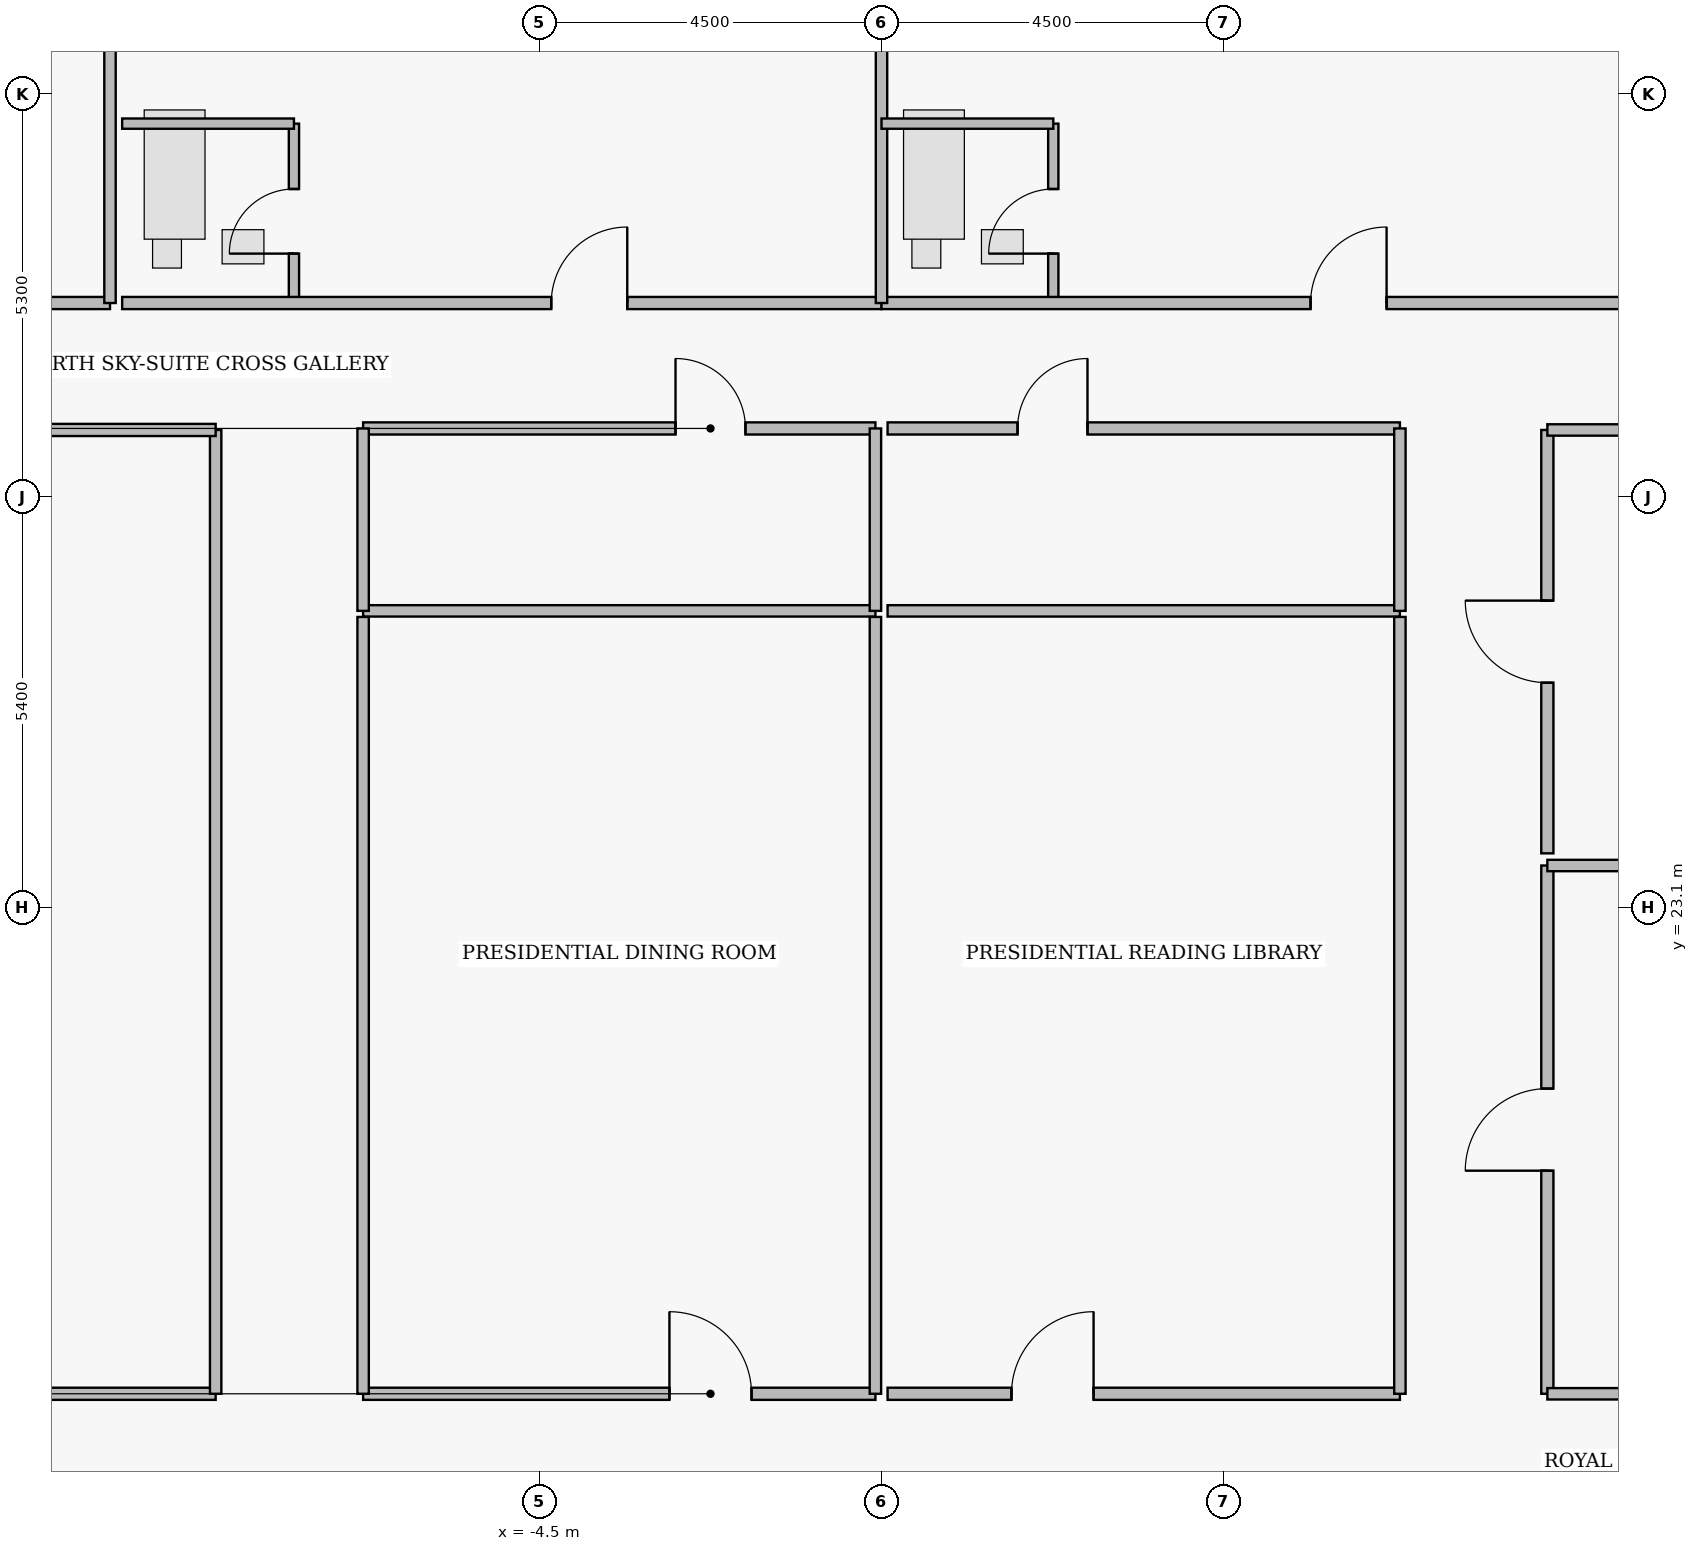
"""IFC4 building model, lengths in metres.
Left out: names, types, materials, properties, quantities, classifications, styles, units other than length and angle.
Written with IfcOpenShell. Run it as: python <this file> out.ifc"""

import sys

from ifc_helpers import new_model, si_unit, direction, frame, frame_2d, origin, place, context, subcontext, project, spatial, rectangle, extrude, element, fill, save


model = new_model("IFC4")
c1 = context("Model", 3, precision=1e-05, world=origin(), true_north=direction((0.0, 1.0)))
c2 = subcontext(c1, "Body", "Model", "MODEL_VIEW")
j1 = project(units=[si_unit("LENGTHUNIT", "METRE"), si_unit("PLANEANGLEUNIT", "RADIAN")], contexts=[c1])
p1 = place(None, origin())
s1 = spatial("IfcSite", under=j1, at=p1, CompositionType="ELEMENT")
p2 = place(p1, origin())
s2 = spatial("IfcBuilding", under=s1, at=p2, CompositionType="ELEMENT")
p3 = place(p2, frame((0.0, 0.0, 250.75)))
s3 = spatial("IfcBuildingStorey", under=s2, at=p3, CompositionType="ELEMENT", Elevation=250.75)
p4 = place(p3, frame((-20.14, 31.05, 0.0), z_axis=(0.0, 0.0, 1.0), x_axis=(1.0, 0.0, 0.0)))
e1 = element("IfcWall", 1, at=p4, inside=s3, PredefinedType="PARTITIONING", context=c2, shape_type="SweptSolid", body=[
    extrude(rectangle(XDim=9.99, YDim=0.16, at=frame_2d((4.995, 0.0))), origin(), (0.0, 0.0, 1.0), 3.48),
])
p5 = place(p4, frame((5.645, 0.0, 0.0)))
e2 = element("IfcOpeningElement", 2, at=p5, cuts=e1, PredefinedType="OPENING", context=c2, shape_type="SweptSolid", body=[
    extrude(rectangle(XDim=1.0, YDim=2.15, at=frame_2d((0.5, 1.075))), frame((0.0, 0.09, 0.0), z_axis=(0.0, -1.0, 0.0), x_axis=(1.0, 0.0, 0.0)), (0.0, 0.0, 1.0), 0.18),
])
p6 = place(p3, frame((-7.73, 31.05, 0.0), z_axis=(0.0, 0.0, 1.0), x_axis=(0.0, 1.0, 0.0)))
e3 = element("IfcWall", 3, at=p6, inside=s3, PredefinedType="PLUMBINGWALL", context=c2, shape_type="SweptSolid", body=[
    extrude(rectangle(XDim=2.36, YDim=0.135, at=frame_2d((1.18, 0.0))), origin(), (0.0, 0.0, 1.0), 3.48),
])
p7 = place(p6, frame((0.65, 0.0, 0.0)))
e4 = element("IfcOpeningElement", 4, at=p7, cuts=e3, PredefinedType="OPENING", context=c2, shape_type="SweptSolid", body=[
    extrude(rectangle(XDim=0.85, YDim=2.1, at=frame_2d((0.425, 1.05))), frame((0.0, 0.077, 0.0), z_axis=(0.0, -1.0, 0.0), x_axis=(1.0, 0.0, 0.0)), (0.0, 0.0, 1.0), 0.155),
])
p8 = place(p3, frame((-9.99, 31.05, 0.0), z_axis=(0.0, 0.0, 1.0), x_axis=(1.0, 0.0, 0.0)))
e5 = element("IfcWall", 5, at=p8, inside=s3, PredefinedType="PARTITIONING", context=c2, shape_type="SweptSolid", body=[
    extrude(rectangle(XDim=9.99, YDim=0.16, at=frame_2d((4.995, 0.0))), origin(), (0.0, 0.0, 1.0), 3.48),
])
p9 = place(p8, frame((5.645, 0.0, 0.0)))
e6 = element("IfcOpeningElement", 6, at=p9, cuts=e5, PredefinedType="OPENING", context=c2, shape_type="SweptSolid", body=[
    extrude(rectangle(XDim=1.0, YDim=2.15, at=frame_2d((0.5, 1.075))), frame((0.0, 0.09, 0.0), z_axis=(0.0, -1.0, 0.0), x_axis=(1.0, 0.0, 0.0)), (0.0, 0.0, 1.0), 0.18),
])
p10 = place(p3, frame((2.26, 31.05, 0.0), z_axis=(0.0, 0.0, 1.0), x_axis=(0.0, 1.0, 0.0)))
e7 = element("IfcWall", 7, at=p10, inside=s3, PredefinedType="PLUMBINGWALL", context=c2, shape_type="SweptSolid", body=[
    extrude(rectangle(XDim=2.36, YDim=0.135, at=frame_2d((1.18, 0.0))), origin(), (0.0, 0.0, 1.0), 3.48),
])
p11 = place(p10, frame((0.65, 0.0, 0.0)))
e8 = element("IfcOpeningElement", 8, at=p11, cuts=e7, PredefinedType="OPENING", context=c2, shape_type="SweptSolid", body=[
    extrude(rectangle(XDim=0.85, YDim=2.1, at=frame_2d((0.425, 1.05))), frame((0.0, 0.077, 0.0), z_axis=(0.0, -1.0, 0.0), x_axis=(1.0, 0.0, 0.0)), (0.0, 0.0, 1.0), 0.155),
])
p12 = place(p3, frame((0.0, 31.05, 0.0), z_axis=(0.0, 0.0, 1.0), x_axis=(1.0, 0.0, 0.0)))
e9 = element("IfcWall", 9, at=p12, inside=s3, PredefinedType="PARTITIONING", context=c2, shape_type="SweptSolid", body=[
    extrude(rectangle(XDim=9.99, YDim=0.16, at=frame_2d((4.995, 0.0))), origin(), (0.0, 0.0, 1.0), 3.48),
])
p13 = place(p12, frame((5.645, 0.0, 0.0)))
e10 = element("IfcOpeningElement", 10, at=p13, cuts=e9, PredefinedType="OPENING", context=c2, shape_type="SweptSolid", body=[
    extrude(rectangle(XDim=1.0, YDim=2.15, at=frame_2d((0.5, 1.075))), frame((0.0, 0.09, 0.0), z_axis=(0.0, -1.0, 0.0), x_axis=(1.0, 0.0, 0.0)), (0.0, 0.0, 1.0), 0.18),
])
p14 = place(p3, frame((-6.82, 29.4, 0.0), z_axis=(0.0, 0.0, 1.0), x_axis=(1.0, 0.0, 0.0)))
e11 = element("IfcWall", 11, at=p14, inside=s3, PredefinedType="PARTITIONING", context=c2, shape_type="SweptSolid", body=[
    extrude(rectangle(XDim=6.74, YDim=0.16, at=frame_2d((3.37, 0.0))), origin(), (0.0, 0.0, 1.0), 3.48),
])
p15 = place(p14, frame((4.11, 0.0, 0.0)))
e12 = element("IfcOpeningElement", 12, at=p15, cuts=e11, PredefinedType="OPENING", context=c2, shape_type="SweptSolid", body=[
    extrude(rectangle(XDim=0.92, YDim=2.12, at=frame_2d((0.46, 1.06))), frame((0.0, 0.09, 0.0), z_axis=(0.0, -1.0, 0.0), x_axis=(1.0, 0.0, 0.0)), (0.0, 0.0, 1.0), 0.18),
])
p16 = place(p3, frame((0.08, 29.4, 0.0), z_axis=(0.0, 0.0, 1.0), x_axis=(1.0, 0.0, 0.0)))
e13 = element("IfcWall", 13, at=p16, inside=s3, PredefinedType="PARTITIONING", context=c2, shape_type="SweptSolid", body=[
    extrude(rectangle(XDim=6.74, YDim=0.16, at=frame_2d((3.37, 0.0))), origin(), (0.0, 0.0, 1.0), 3.48),
])
p17 = place(p16, frame((1.71, 0.0, 0.0)))
e14 = element("IfcOpeningElement", 14, at=p17, cuts=e13, PredefinedType="OPENING", context=c2, shape_type="SweptSolid", body=[
    extrude(rectangle(XDim=0.92, YDim=2.12, at=frame_2d((0.46, 1.06))), frame((0.0, 0.09, 0.0), z_axis=(0.0, -1.0, 0.0), x_axis=(1.0, 0.0, 0.0)), (0.0, 0.0, 1.0), 0.18),
])
p18 = place(p3, frame((-6.82, 16.7, 0.0), z_axis=(0.0, 0.0, 1.0), x_axis=(1.0, 0.0, 0.0)))
e15 = element("IfcWall", 15, at=p18, inside=s3, PredefinedType="PARTITIONING", context=c2, shape_type="SweptSolid", body=[
    extrude(rectangle(XDim=6.74, YDim=0.16, at=frame_2d((3.37, 0.0))), origin(), (0.0, 0.0, 1.0), 3.076),
])
p19 = place(p18, frame((4.03, 0.0, 0.0)))
e16 = element("IfcOpeningElement", 16, at=p19, cuts=e15, PredefinedType="OPENING", context=c2, shape_type="SweptSolid", body=[
    extrude(rectangle(XDim=1.08, YDim=2.18, at=frame_2d((0.54, 1.09))), frame((0.0, 0.09, 0.0), z_axis=(0.0, -1.0, 0.0), x_axis=(1.0, 0.0, 0.0)), (0.0, 0.0, 1.0), 0.18),
])
p20 = place(p3, frame((0.08, 16.7, 0.0), z_axis=(0.0, 0.0, 1.0), x_axis=(1.0, 0.0, 0.0)))
e17 = element("IfcWall", 17, at=p20, inside=s3, PredefinedType="PARTITIONING", context=c2, shape_type="SweptSolid", body=[
    extrude(rectangle(XDim=6.74, YDim=0.16, at=frame_2d((3.37, 0.0))), origin(), (0.0, 0.0, 1.0), 3.076),
])
p21 = place(p20, frame((1.63, 0.0, 0.0)))
e18 = element("IfcOpeningElement", 18, at=p21, cuts=e17, PredefinedType="OPENING", context=c2, shape_type="SweptSolid", body=[
    extrude(rectangle(XDim=1.08, YDim=2.18, at=frame_2d((0.54, 1.09))), frame((0.0, 0.09, 0.0), z_axis=(0.0, -1.0, 0.0), x_axis=(1.0, 0.0, 0.0)), (0.0, 0.0, 1.0), 0.18),
])
p22 = place(p3, frame((-22.64, 16.7, 0.0), z_axis=(0.0, 0.0, 1.0), x_axis=(1.0, 0.0, 0.0)))
e19 = element("IfcWall", 19, at=p22, inside=s3, PredefinedType="PARTITIONING", context=c2, shape_type="SweptSolid", body=[
    extrude(rectangle(XDim=13.88, YDim=0.16, at=frame_2d((6.94, 0.0))), origin(), (0.0, 0.0, 1.0), 3.076),
])
p23 = place(p22, frame((7.59, 0.0, 0.0)))
e20 = element("IfcOpeningElement", 20, at=p23, cuts=e19, PredefinedType="OPENING", context=c2, shape_type="SweptSolid", body=[
    extrude(rectangle(XDim=1.0, YDim=2.15, at=frame_2d((0.5, 1.075))), frame((0.0, 0.09, 0.0), z_axis=(0.0, -1.0, 0.0), x_axis=(1.0, 0.0, 0.0)), (0.0, 0.0, 1.0), 0.18),
])
p24 = place(p3, frame((8.76, 16.7, 0.0), z_axis=(0.0, 0.0, 1.0), x_axis=(0.0, 1.0, 0.0)))
e21 = element("IfcWall", 21, at=p24, inside=s3, PredefinedType="PARTITIONING", context=c2, shape_type="SweptSolid", body=[
    extrude(rectangle(XDim=6.95, YDim=0.16, at=frame_2d((3.475, 0.0))), origin(), (0.0, 0.0, 1.0), 3.48),
])
p25 = place(p24, frame((2.935, 0.0, 0.0)))
e22 = element("IfcOpeningElement", 22, at=p25, cuts=e21, PredefinedType="OPENING", context=c2, shape_type="SweptSolid", body=[
    extrude(rectangle(XDim=1.08, YDim=2.18, at=frame_2d((0.54, 1.09))), frame((0.0, 0.09, 0.0), z_axis=(0.0, -1.0, 0.0), x_axis=(1.0, 0.0, 0.0)), (0.0, 0.0, 1.0), 0.18),
])
p26 = place(p3, frame((8.76, 23.81, 0.0), z_axis=(0.0, 0.0, 1.0), x_axis=(0.0, 1.0, 0.0)))
e23 = element("IfcWall", 23, at=p26, inside=s3, PredefinedType="PARTITIONING", context=c2, shape_type="SweptSolid", body=[
    extrude(rectangle(XDim=5.57, YDim=0.16, at=frame_2d((2.785, 0.0))), origin(), (0.0, 0.0, 1.0), 3.48),
])
p27 = place(p26, frame((2.245, 0.0, 0.0)))
e24 = element("IfcOpeningElement", 24, at=p27, cuts=e23, PredefinedType="OPENING", context=c2, shape_type="SweptSolid", body=[
    extrude(rectangle(XDim=1.08, YDim=2.18, at=frame_2d((0.54, 1.09))), frame((0.0, 0.09, 0.0), z_axis=(0.0, -1.0, 0.0), x_axis=(1.0, 0.0, 0.0)), (0.0, 0.0, 1.0), 0.18),
])
p28 = place(p3, frame((-10.15, 31.05, 0.0), z_axis=(0.0, 0.0, 1.0), x_axis=(0.0, 1.0, 0.0)))
e25 = element("IfcWall", 25, at=p28, inside=s3, PredefinedType="PARTITIONING", context=c2, shape_type="SweptSolid", body=[
    extrude(rectangle(XDim=7.87, YDim=0.15, at=frame_2d((3.935, 0.0))), origin(), (0.0, 0.0, 1.0), 3.48),
])
p29 = place(p3, frame((-9.99, 33.41, 0.0), z_axis=(0.0, 0.0, 1.0), x_axis=(1.0, 0.0, 0.0)))
e26 = element("IfcWall", 26, at=p29, inside=s3, PredefinedType="PLUMBINGWALL", context=c2, shape_type="SweptSolid", body=[
    extrude(rectangle(XDim=2.26, YDim=0.135, at=frame_2d((1.13, 0.0))), origin(), (0.0, 0.0, 1.0), 3.076),
])
p30 = place(p3, frame((0.0, 31.05, 0.0), z_axis=(0.0, 0.0, 1.0), x_axis=(0.0, 1.0, 0.0)))
e27 = element("IfcWall", 27, at=p30, inside=s3, PredefinedType="PARTITIONING", context=c2, shape_type="SweptSolid", body=[
    extrude(rectangle(XDim=7.87, YDim=0.15, at=frame_2d((3.935, 0.0))), origin(), (0.0, 0.0, 1.0), 3.48),
])
p31 = place(p3, frame((0.0, 33.41, 0.0), z_axis=(0.0, 0.0, 1.0), x_axis=(1.0, 0.0, 0.0)))
e28 = element("IfcWall", 28, at=p31, inside=s3, PredefinedType="PLUMBINGWALL", context=c2, shape_type="SweptSolid", body=[
    extrude(rectangle(XDim=2.26, YDim=0.135, at=frame_2d((1.13, 0.0))), origin(), (0.0, 0.0, 1.0), 3.076),
])
p32 = place(p3, frame((-6.82, 27.0, 0.0), z_axis=(0.0, 0.0, 1.0), x_axis=(1.0, 0.0, 0.0)))
e29 = element("IfcWall", 29, at=p32, inside=s3, PredefinedType="PARTITIONING", context=c2, shape_type="SweptSolid", body=[
    extrude(rectangle(XDim=6.74, YDim=0.15, at=frame_2d((3.37, 0.0))), origin(), (0.0, 0.0, 1.0), 3.48),
])
for number, where, z_axis, x_axis in (
    (30, (-6.82, 27.0, 0.0), (0.0, 0.0, 1.0), (0.0, 1.0, 0.0)),
    (31, (-0.08, 27.0, 0.0), (0.0, 0.0, 1.0), (0.0, 1.0, 0.0)),
):
    element("IfcWall", number, at=place(p3, frame(where, z_axis=z_axis, x_axis=x_axis)), inside=s3, PredefinedType="PARTITIONING", context=c2, shape_type="SweptSolid", body=[
        extrude(rectangle(XDim=2.4, YDim=0.15, at=frame_2d((1.2, 0.0))), origin(), (0.0, 0.0, 1.0), 3.48),
    ])
p33 = place(p3, frame((0.08, 27.0, 0.0), z_axis=(0.0, 0.0, 1.0), x_axis=(1.0, 0.0, 0.0)))
e32 = element("IfcWall", 32, at=p33, inside=s3, PredefinedType="PARTITIONING", context=c2, shape_type="SweptSolid", body=[
    extrude(rectangle(XDim=6.74, YDim=0.15, at=frame_2d((3.37, 0.0))), origin(), (0.0, 0.0, 1.0), 3.48),
])
p34 = place(p3, frame((6.82, 27.0, 0.0), z_axis=(0.0, 0.0, 1.0), x_axis=(0.0, 1.0, 0.0)))
e33 = element("IfcWall", 33, at=p34, inside=s3, PredefinedType="PARTITIONING", context=c2, shape_type="SweptSolid", body=[
    extrude(rectangle(XDim=2.4, YDim=0.15, at=frame_2d((1.2, 0.0))), origin(), (0.0, 0.0, 1.0), 3.48),
])
for number, where, z_axis, x_axis in (
    (34, (-6.82, 16.7, 0.0), (0.0, 0.0, 1.0), (0.0, 1.0, 0.0)),
    (35, (-0.08, 16.7, 0.0), (0.0, 0.0, 1.0), (0.0, 1.0, 0.0)),
    (36, (6.82, 16.7, 0.0), (0.0, 0.0, 1.0), (0.0, 1.0, 0.0)),
):
    element("IfcWall", number, at=place(p3, frame(where, z_axis=z_axis, x_axis=x_axis)), inside=s3, PredefinedType="PARTITIONING", context=c2, shape_type="SweptSolid", body=[
        extrude(rectangle(XDim=10.22, YDim=0.15, at=frame_2d((5.11, 0.0))), origin(), (0.0, 0.0, 1.0), 3.48),
    ])
p35 = place(p3, frame((-8.76, 16.7, 0.0), z_axis=(0.0, 0.0, 1.0), x_axis=(0.0, 1.0, 0.0)))
e37 = element("IfcWall", 37, at=p35, inside=s3, PredefinedType="PARTITIONING", context=c2, shape_type="SweptSolid", body=[
    extrude(rectangle(XDim=12.68, YDim=0.15, at=frame_2d((6.34, 0.0))), origin(), (0.0, 0.0, 1.0), 3.48),
])
p36 = place(p3, frame((-22.64, 29.38, 0.0), z_axis=(0.0, 0.0, 1.0), x_axis=(1.0, 0.0, 0.0)))
e38 = element("IfcWall", 38, at=p36, inside=s3, PredefinedType="PARTITIONING", context=c2, shape_type="SweptSolid", body=[
    extrude(rectangle(XDim=13.88, YDim=0.16, at=frame_2d((6.94, 0.0))), origin(), (0.0, 0.0, 1.0), 3.48),
])
p37 = place(p3, frame((8.76, 16.7, 0.0), z_axis=(0.0, 0.0, 1.0), x_axis=(1.0, 0.0, 0.0)))
e39 = element("IfcWall", 39, at=p37, inside=s3, PredefinedType="PARTITIONING", context=c2, shape_type="SweptSolid", body=[
    extrude(rectangle(XDim=12.358, YDim=0.15, at=frame_2d((6.179, 0.0))), origin(), (0.0, 0.0, 1.0), 3.076),
])
p38 = place(p3, frame((8.76, 23.65, 0.0), z_axis=(0.0, 0.0, 1.0), x_axis=(1.0, 0.0, 0.0)))
e40 = element("IfcWall", 40, at=p38, inside=s3, PredefinedType="PARTITIONING", context=c2, shape_type="SweptSolid", body=[
    extrude(rectangle(XDim=11.625, YDim=0.15, at=frame_2d((5.812, 0.0))), origin(), (0.0, 0.0, 1.0), 3.48),
])
p39 = place(p3, frame((8.76, 29.38, 0.0), z_axis=(0.0, 0.0, 1.0), x_axis=(1.0, 0.0, 0.0)))
e41 = element("IfcWall", 41, at=p39, inside=s3, PredefinedType="PARTITIONING", context=c2, shape_type="SweptSolid", body=[
    extrude(rectangle(XDim=11.38, YDim=0.15, at=frame_2d((5.69, 0.0))), origin(), (0.0, 0.0, 1.0), 3.48),
])
p40 = place(p7, origin())
e42 = element("IfcDoor", 42, at=p40, inside=s3, OperationType="SINGLE_SWING_LEFT", PredefinedType="DOOR", context=c2, shape_type="SweptSolid", body=[
    extrude(rectangle(XDim=0.85, YDim=2.1, at=frame_2d((0.425, 1.05))), frame((0.0, 0.025, 0.0), z_axis=(0.0, -1.0, 0.0), x_axis=(1.0, 0.0, 0.0)), (0.0, 0.0, 1.0), 0.05),
])
fill(e4, e42)
p41 = place(p9, origin())
e43 = element("IfcDoor", 43, at=p41, inside=s3, OperationType="SINGLE_SWING_RIGHT", PredefinedType="DOOR", context=c2, shape_type="SweptSolid", body=[
    extrude(rectangle(XDim=1.0, YDim=2.15, at=frame_2d((0.5, 1.075))), frame((0.0, 0.025, 0.0), z_axis=(0.0, -1.0, 0.0), x_axis=(1.0, 0.0, 0.0)), (0.0, 0.0, 1.0), 0.05),
])
fill(e6, e43)
p42 = place(p11, origin())
e44 = element("IfcDoor", 44, at=p42, inside=s3, OperationType="SINGLE_SWING_LEFT", PredefinedType="DOOR", context=c2, shape_type="SweptSolid", body=[
    extrude(rectangle(XDim=0.85, YDim=2.1, at=frame_2d((0.425, 1.05))), frame((0.0, 0.025, 0.0), z_axis=(0.0, -1.0, 0.0), x_axis=(1.0, 0.0, 0.0)), (0.0, 0.0, 1.0), 0.05),
])
fill(e8, e44)
p43 = place(p13, origin())
e45 = element("IfcDoor", 45, at=p43, inside=s3, OperationType="SINGLE_SWING_RIGHT", PredefinedType="DOOR", context=c2, shape_type="SweptSolid", body=[
    extrude(rectangle(XDim=1.0, YDim=2.15, at=frame_2d((0.5, 1.075))), frame((0.0, 0.025, 0.0), z_axis=(0.0, -1.0, 0.0), x_axis=(1.0, 0.0, 0.0)), (0.0, 0.0, 1.0), 0.05),
])
fill(e10, e45)
p44 = place(p15, origin())
e46 = element("IfcDoor", 46, at=p44, inside=s3, OperationType="SINGLE_SWING_LEFT", PredefinedType="DOOR", context=c2, shape_type="SweptSolid", body=[
    extrude(rectangle(XDim=0.92, YDim=2.12, at=frame_2d((0.46, 1.06))), frame((0.0, 0.025, 0.0), z_axis=(0.0, -1.0, 0.0), x_axis=(1.0, 0.0, 0.0)), (0.0, 0.0, 1.0), 0.05),
])
fill(e12, e46)
p45 = place(p17, origin())
e47 = element("IfcDoor", 47, at=p45, inside=s3, OperationType="SINGLE_SWING_RIGHT", PredefinedType="DOOR", context=c2, shape_type="SweptSolid", body=[
    extrude(rectangle(XDim=0.92, YDim=2.12, at=frame_2d((0.46, 1.06))), frame((0.0, 0.025, 0.0), z_axis=(0.0, -1.0, 0.0), x_axis=(1.0, 0.0, 0.0)), (0.0, 0.0, 1.0), 0.05),
])
fill(e14, e47)
p46 = place(p19, origin())
e48 = element("IfcDoor", 48, at=p46, inside=s3, OperationType="SINGLE_SWING_LEFT", PredefinedType="DOOR", context=c2, shape_type="SweptSolid", body=[
    extrude(rectangle(XDim=1.08, YDim=2.18, at=frame_2d((0.54, 1.09))), frame((0.0, 0.025, 0.0), z_axis=(0.0, -1.0, 0.0), x_axis=(1.0, 0.0, 0.0)), (0.0, 0.0, 1.0), 0.05),
])
fill(e16, e48)
p47 = place(p21, origin())
e49 = element("IfcDoor", 49, at=p47, inside=s3, OperationType="SINGLE_SWING_RIGHT", PredefinedType="DOOR", context=c2, shape_type="SweptSolid", body=[
    extrude(rectangle(XDim=1.08, YDim=2.18, at=frame_2d((0.54, 1.09))), frame((0.0, 0.025, 0.0), z_axis=(0.0, -1.0, 0.0), x_axis=(1.0, 0.0, 0.0)), (0.0, 0.0, 1.0), 0.05),
])
fill(e18, e49)
p48 = place(p25, origin())
e50 = element("IfcDoor", 50, at=p48, inside=s3, OperationType="SINGLE_SWING_LEFT", PredefinedType="DOOR", context=c2, shape_type="SweptSolid", body=[
    extrude(rectangle(XDim=1.08, YDim=2.18, at=frame_2d((0.54, 1.09))), frame((0.0, 0.025, 0.0), z_axis=(0.0, -1.0, 0.0), x_axis=(1.0, 0.0, 0.0)), (0.0, 0.0, 1.0), 0.05),
])
fill(e22, e50)
p49 = place(p27, origin())
e51 = element("IfcDoor", 51, at=p49, inside=s3, OperationType="SINGLE_SWING_RIGHT", PredefinedType="DOOR", context=c2, shape_type="SweptSolid", body=[
    extrude(rectangle(XDim=1.08, YDim=2.18, at=frame_2d((0.54, 1.09))), frame((0.0, 0.025, 0.0), z_axis=(0.0, -1.0, 0.0), x_axis=(1.0, 0.0, 0.0)), (0.0, 0.0, 1.0), 0.05),
])
fill(e24, e51)
save(model, sys.argv[1])
